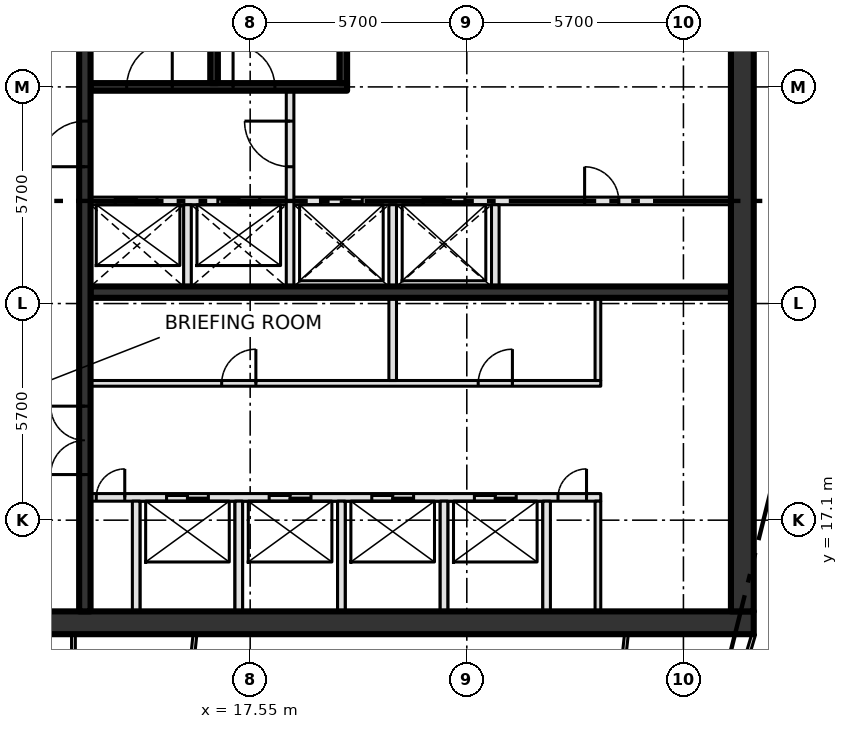
"""IFC4 building model, lengths in metres.
Left out: names, types, materials, properties, quantities, classifications, styles, units other than length and angle.
Written with IfcOpenShell. Run it as: python <this file> out.ifc"""

import sys

from ifc_helpers import new_model, si_unit, direction, frame, frame_2d, origin, place, context, subcontext, project, spatial, rectangle, extrude, element, fill, save


model = new_model("IFC4")
c1 = context("Model", 3, precision=1e-05, world=origin(), true_north=direction((0.0, 1.0)))
c2 = subcontext(c1, "Body", "Model", "MODEL_VIEW")
j1 = project(units=[si_unit("LENGTHUNIT", "METRE"), si_unit("PLANEANGLEUNIT", "RADIAN")], contexts=[c1])
p1 = place(None, origin())
s1 = spatial("IfcSite", under=j1, at=p1, CompositionType="ELEMENT")
p2 = place(p1, origin())
s2 = spatial("IfcBuilding", under=s1, at=p2, CompositionType="ELEMENT")
p3 = place(p2, frame((0.0, 0.0, 315.0)))
s3 = spatial("IfcBuildingStorey", under=s2, at=p3, CompositionType="ELEMENT", Elevation=315.0)
p4 = place(p3, frame((8.0, 14.4, -0.3), z_axis=(0.0, 0.0, 1.0), x_axis=(1.0, 0.0, 0.0)))
e1 = element("IfcWall", 1, at=p4, inside=s3, PredefinedType="SHEAR", context=c2, shape_type="SweptSolid", body=[
    extrude(rectangle(XDim=22.8, YDim=0.6, at=frame_2d((11.4, 0.0))), origin(), (0.0, 0.0, 1.0), 4.2),
])
p5 = place(p4, frame((2.3, 0.0, 0.3)))
e2 = element("IfcOpeningElement", 2, at=p5, cuts=e1, PredefinedType="OPENING", context=c2, shape_type="SweptSolid", body=[
    extrude(rectangle(XDim=1.8, YDim=2.1, at=frame_2d((0.9, 1.05))), frame((0.0, 0.31, 0.0), z_axis=(0.0, -1.0, 0.0), x_axis=(1.0, 0.0, 0.0)), (0.0, 0.0, 1.0), 0.62),
])
p6 = place(p3, frame((30.5, 14.7, -0.3), z_axis=(0.0, 0.0, 1.0), x_axis=(0.0, 1.0, 0.0)))
e3 = element("IfcWall", 3, at=p6, inside=s3, PredefinedType="SHEAR", context=c2, shape_type="SweptSolid", body=[
    extrude(rectangle(XDim=21.0, YDim=0.6, at=frame_2d((10.5, 0.0))), origin(), (0.0, 0.0, 1.0), 4.2),
])
p7 = place(p3, frame((13.35, 17.7, 0.0), z_axis=(0.0, 0.0, 1.0), x_axis=(1.0, 0.0, 0.0)))
e4 = element("IfcWall", 4, at=p7, inside=s3, PredefinedType="SOLIDWALL", context=c2, shape_type="SweptSolid", body=[
    extrude(rectangle(XDim=13.425, YDim=0.2, at=frame_2d((6.712, 0.0))), origin(), (0.0, 0.0, 1.0), 3.9),
])
p8 = place(p7, frame((2.0, 0.0, 0.0)))
e5 = element("IfcOpeningElement", 5, at=p8, cuts=e4, PredefinedType="OPENING", context=c2, shape_type="SweptSolid", body=[
    extrude(rectangle(XDim=1.1, YDim=2.1, at=frame_2d((0.55, 1.05))), frame((0.0, 0.11, 0.0), z_axis=(0.0, -1.0, 0.0), x_axis=(1.0, 0.0, 0.0)), (0.0, 0.0, 1.0), 0.22),
])
p9 = place(p7, frame((4.7, 0.0, 0.0)))
e6 = element("IfcOpeningElement", 6, at=p9, cuts=e4, PredefinedType="OPENING", context=c2, shape_type="SweptSolid", body=[
    extrude(rectangle(XDim=1.1, YDim=2.1, at=frame_2d((0.55, 1.05))), frame((0.0, 0.11, 0.0), z_axis=(0.0, -1.0, 0.0), x_axis=(1.0, 0.0, 0.0)), (0.0, 0.0, 1.0), 0.22),
])
p10 = place(p7, frame((7.4, 0.0, 0.0)))
e7 = element("IfcOpeningElement", 7, at=p10, cuts=e4, PredefinedType="OPENING", context=c2, shape_type="SweptSolid", body=[
    extrude(rectangle(XDim=1.1, YDim=2.1, at=frame_2d((0.55, 1.05))), frame((0.0, 0.11, 0.0), z_axis=(0.0, -1.0, 0.0), x_axis=(1.0, 0.0, 0.0)), (0.0, 0.0, 1.0), 0.22),
])
p11 = place(p7, frame((10.1, 0.0, 0.0)))
e8 = element("IfcOpeningElement", 8, at=p11, cuts=e4, PredefinedType="OPENING", context=c2, shape_type="SweptSolid", body=[
    extrude(rectangle(XDim=1.1, YDim=2.1, at=frame_2d((0.55, 1.05))), frame((0.0, 0.11, 0.0), z_axis=(0.0, -1.0, 0.0), x_axis=(1.0, 0.0, 0.0)), (0.0, 0.0, 1.0), 0.22),
])
p12 = place(p7, frame((0.15, 0.0, 0.0)))
e9 = element("IfcOpeningElement", 9, at=p12, cuts=e4, PredefinedType="OPENING", context=c2, shape_type="SweptSolid", body=[
    extrude(rectangle(XDim=0.75, YDim=2.1, at=frame_2d((0.375, 1.05))), frame((0.0, 0.11, 0.0), z_axis=(0.0, -1.0, 0.0), x_axis=(1.0, 0.0, 0.0)), (0.0, 0.0, 1.0), 0.22),
])
p13 = place(p7, frame((12.3, 0.0, 0.0)))
e10 = element("IfcOpeningElement", 10, at=p13, cuts=e4, PredefinedType="OPENING", context=c2, shape_type="SweptSolid", body=[
    extrude(rectangle(XDim=0.75, YDim=2.1, at=frame_2d((0.375, 1.05))), frame((0.0, 0.11, 0.0), z_axis=(0.0, -1.0, 0.0), x_axis=(1.0, 0.0, 0.0)), (0.0, 0.0, 1.0), 0.22),
])
p14 = place(p3, frame((13.35, 20.7, 0.0), z_axis=(0.0, 0.0, 1.0), x_axis=(1.0, 0.0, 0.0)))
e11 = element("IfcWall", 11, at=p14, inside=s3, PredefinedType="PARTITIONING", context=c2, shape_type="SweptSolid", body=[
    extrude(rectangle(XDim=13.425, YDim=0.15, at=frame_2d((6.712, 0.0))), origin(), (0.0, 0.0, 1.0), 3.9),
])
p15 = place(p14, frame((3.45, 0.0, 0.0)))
e12 = element("IfcOpeningElement", 12, at=p15, cuts=e11, PredefinedType="OPENING", context=c2, shape_type="SweptSolid", body=[
    extrude(rectangle(XDim=0.9, YDim=2.1, at=frame_2d((0.45, 1.05))), frame((0.0, 0.085, 0.0), z_axis=(0.0, -1.0, 0.0), x_axis=(1.0, 0.0, 0.0)), (0.0, 0.0, 1.0), 0.17),
])
p16 = place(p14, frame((10.2, 0.0, 0.0)))
e13 = element("IfcOpeningElement", 13, at=p16, cuts=e11, PredefinedType="OPENING", context=c2, shape_type="SweptSolid", body=[
    extrude(rectangle(XDim=0.9, YDim=2.1, at=frame_2d((0.45, 1.05))), frame((0.0, 0.085, 0.0), z_axis=(0.0, -1.0, 0.0), x_axis=(1.0, 0.0, 0.0)), (0.0, 0.0, 1.0), 0.17),
])
p17 = place(p3, frame((13.35, 23.1, 0.0), z_axis=(0.0, 0.0, 1.0), x_axis=(1.0, 0.0, 0.0)))
e14 = element("IfcWall", 14, at=p17, inside=s3, PredefinedType="SHEAR", context=c2, shape_type="SweptSolid", body=[
    extrude(rectangle(XDim=16.85, YDim=0.3, at=frame_2d((8.425, 0.0))), origin(), (0.0, 0.0, 1.0), 3.9),
])
p18 = place(p3, frame((13.35, 25.5, 0.0), z_axis=(0.0, 0.0, 1.0), x_axis=(1.0, 0.0, 0.0)))
e15 = element("IfcWall", 15, at=p18, inside=s3, PredefinedType="SOLIDWALL", context=c2, shape_type="SweptSolid", body=[
    extrude(rectangle(XDim=16.85, YDim=0.2, at=frame_2d((8.425, 0.0))), origin(), (0.0, 0.0, 1.0), 3.9),
])
p19 = place(p18, frame((0.65, 0.0, 0.0)))
e16 = element("IfcOpeningElement", 16, at=p19, cuts=e15, PredefinedType="OPENING", context=c2, shape_type="SweptSolid", body=[
    extrude(rectangle(XDim=1.1, YDim=2.1, at=frame_2d((0.55, 1.05))), frame((0.0, 0.11, 0.0), z_axis=(0.0, -1.0, 0.0), x_axis=(1.0, 0.0, 0.0)), (0.0, 0.0, 1.0), 0.22),
])
p20 = place(p18, frame((3.35, 0.0, 0.0)))
e17 = element("IfcOpeningElement", 17, at=p20, cuts=e15, PredefinedType="OPENING", context=c2, shape_type="SweptSolid", body=[
    extrude(rectangle(XDim=1.1, YDim=2.1, at=frame_2d((0.55, 1.05))), frame((0.0, 0.11, 0.0), z_axis=(0.0, -1.0, 0.0), x_axis=(1.0, 0.0, 0.0)), (0.0, 0.0, 1.0), 0.22),
])
p21 = place(p18, frame((6.05, 0.0, 0.0)))
e18 = element("IfcOpeningElement", 18, at=p21, cuts=e15, PredefinedType="OPENING", context=c2, shape_type="SweptSolid", body=[
    extrude(rectangle(XDim=1.1, YDim=2.1, at=frame_2d((0.55, 1.05))), frame((0.0, 0.11, 0.0), z_axis=(0.0, -1.0, 0.0), x_axis=(1.0, 0.0, 0.0)), (0.0, 0.0, 1.0), 0.22),
])
p22 = place(p18, frame((8.75, 0.0, 0.0)))
e19 = element("IfcOpeningElement", 19, at=p22, cuts=e15, PredefinedType="OPENING", context=c2, shape_type="SweptSolid", body=[
    extrude(rectangle(XDim=1.1, YDim=2.1, at=frame_2d((0.55, 1.05))), frame((0.0, 0.11, 0.0), z_axis=(0.0, -1.0, 0.0), x_axis=(1.0, 0.0, 0.0)), (0.0, 0.0, 1.0), 0.22),
])
p23 = place(p18, frame((13.0, 0.0, 0.0)))
e20 = element("IfcOpeningElement", 20, at=p23, cuts=e15, PredefinedType="OPENING", context=c2, shape_type="SweptSolid", body=[
    extrude(rectangle(XDim=0.9, YDim=2.1, at=frame_2d((0.45, 1.05))), frame((0.0, 0.11, 0.0), z_axis=(0.0, -1.0, 0.0), x_axis=(1.0, 0.0, 0.0)), (0.0, 0.0, 1.0), 0.22),
])
p24 = place(p3, frame((13.35, 28.5, 0.0), z_axis=(0.0, 0.0, 1.0), x_axis=(1.0, 0.0, 0.0)))
e21 = element("IfcWall", 21, at=p24, inside=s3, PredefinedType="SOLIDWALL", context=c2, shape_type="SweptSolid", body=[
    extrude(rectangle(XDim=6.75, YDim=0.2, at=frame_2d((3.375, 0.0))), origin(), (0.0, 0.0, 1.0), 3.9),
])
p25 = place(p24, frame((0.95, 0.0, 0.0)))
e22 = element("IfcOpeningElement", 22, at=p25, cuts=e21, PredefinedType="OPENING", context=c2, shape_type="SweptSolid", body=[
    extrude(rectangle(XDim=1.2, YDim=2.1, at=frame_2d((0.6, 1.05))), frame((0.0, 0.11, 0.0), z_axis=(0.0, -1.0, 0.0), x_axis=(1.0, 0.0, 0.0)), (0.0, 0.0, 1.0), 0.22),
])
p26 = place(p24, frame((3.75, 0.0, 0.0)))
e23 = element("IfcOpeningElement", 23, at=p26, cuts=e21, PredefinedType="OPENING", context=c2, shape_type="SweptSolid", body=[
    extrude(rectangle(XDim=1.1, YDim=2.1, at=frame_2d((0.55, 1.05))), frame((0.0, 0.11, 0.0), z_axis=(0.0, -1.0, 0.0), x_axis=(1.0, 0.0, 0.0)), (0.0, 0.0, 1.0), 0.22),
])
p27 = place(p3, frame((13.2, 14.7, 0.0), z_axis=(0.0, 0.0, 1.0), x_axis=(0.0, 1.0, 0.0)))
e24 = element("IfcWall", 24, at=p27, inside=s3, PredefinedType="SHEAR", context=c2, shape_type="SweptSolid", body=[
    extrude(rectangle(XDim=21.0, YDim=0.3, at=frame_2d((10.5, 0.0))), origin(), (0.0, 0.0, 1.0), 3.9),
])
p28 = place(p27, frame((3.6, 0.0, 0.0)))
e25 = element("IfcOpeningElement", 25, at=p28, cuts=e24, PredefinedType="OPENING", context=c2, shape_type="SweptSolid", body=[
    extrude(rectangle(XDim=1.8, YDim=2.1, at=frame_2d((0.9, 1.05))), frame((0.0, 0.16, 0.0), z_axis=(0.0, -1.0, 0.0), x_axis=(1.0, 0.0, 0.0)), (0.0, 0.0, 1.0), 0.32),
])
p29 = place(p27, frame((11.7, 0.0, 0.0)))
e26 = element("IfcOpeningElement", 26, at=p29, cuts=e24, PredefinedType="OPENING", context=c2, shape_type="SweptSolid", body=[
    extrude(rectangle(XDim=1.2, YDim=2.1, at=frame_2d((0.6, 1.05))), frame((0.0, 0.16, 0.0), z_axis=(0.0, -1.0, 0.0), x_axis=(1.0, 0.0, 0.0)), (0.0, 0.0, 1.0), 0.32),
])
p30 = place(p3, frame((14.55, 14.7, 0.0), z_axis=(0.0, 0.0, 1.0), x_axis=(0.0, 1.0, 0.0)))
e27 = element("IfcWall", 27, at=p30, inside=s3, PredefinedType="SOLIDWALL", context=c2, shape_type="SweptSolid", body=[
    extrude(rectangle(XDim=2.9, YDim=0.2, at=frame_2d((1.45, 0.0))), origin(), (0.0, 0.0, 1.0), 3.9),
])
p31 = place(p3, frame((15.9, 23.25, 0.0), z_axis=(0.0, 0.0, 1.0), x_axis=(0.0, 1.0, 0.0)))
e28 = element("IfcWall", 28, at=p31, inside=s3, PredefinedType="SOLIDWALL", context=c2, shape_type="SweptSolid", body=[
    extrude(rectangle(XDim=2.15, YDim=0.2, at=frame_2d((1.075, 0.0))), origin(), (0.0, 0.0, 1.0), 3.9),
])
p32 = place(p3, frame((16.6, 28.6, 0.0), z_axis=(0.0, 0.0, 1.0), x_axis=(0.0, 1.0, 0.0)))
e29 = element("IfcWall", 29, at=p32, inside=s3, PredefinedType="SOLIDWALL", context=c2, shape_type="SweptSolid", body=[
    extrude(rectangle(XDim=7.1, YDim=0.2, at=frame_2d((3.55, 0.0))), origin(), (0.0, 0.0, 1.0), 3.9),
])
p33 = place(p3, frame((17.25, 14.7, 0.0), z_axis=(0.0, 0.0, 1.0), x_axis=(0.0, 1.0, 0.0)))
e30 = element("IfcWall", 30, at=p33, inside=s3, PredefinedType="SOLIDWALL", context=c2, shape_type="SweptSolid", body=[
    extrude(rectangle(XDim=2.9, YDim=0.2, at=frame_2d((1.45, 0.0))), origin(), (0.0, 0.0, 1.0), 3.9),
])
p34 = place(p3, frame((18.6, 23.25, 0.0), z_axis=(0.0, 0.0, 1.0), x_axis=(0.0, 1.0, 0.0)))
e31 = element("IfcWall", 31, at=p34, inside=s3, PredefinedType="SOLIDWALL", context=c2, shape_type="SweptSolid", body=[
    extrude(rectangle(XDim=5.15, YDim=0.2, at=frame_2d((2.575, 0.0))), origin(), (0.0, 0.0, 1.0), 3.9),
])
p35 = place(p34, frame((3.15, 0.0, 0.0)))
e32 = element("IfcOpeningElement", 32, at=p35, cuts=e31, PredefinedType="OPENING", context=c2, shape_type="SweptSolid", body=[
    extrude(rectangle(XDim=1.2, YDim=2.1, at=frame_2d((0.6, 1.05))), frame((0.0, 0.11, 0.0), z_axis=(0.0, -1.0, 0.0), x_axis=(1.0, 0.0, 0.0)), (0.0, 0.0, 1.0), 0.22),
])
p36 = place(p3, frame((19.95, 14.7, 0.0), z_axis=(0.0, 0.0, 1.0), x_axis=(0.0, 1.0, 0.0)))
e33 = element("IfcWall", 33, at=p36, inside=s3, PredefinedType="SOLIDWALL", context=c2, shape_type="SweptSolid", body=[
    extrude(rectangle(XDim=2.9, YDim=0.2, at=frame_2d((1.45, 0.0))), origin(), (0.0, 0.0, 1.0), 3.9),
])
p37 = place(p3, frame((20.0, 28.6, 0.0), z_axis=(0.0, 0.0, 1.0), x_axis=(0.0, 1.0, 0.0)))
e34 = element("IfcWall", 34, at=p37, inside=s3, PredefinedType="SOLIDWALL", context=c2, shape_type="SweptSolid", body=[
    extrude(rectangle(XDim=7.1, YDim=0.2, at=frame_2d((3.55, 0.0))), origin(), (0.0, 0.0, 1.0), 3.9),
])
p38 = place(p3, frame((21.3, 20.775, 0.0), z_axis=(0.0, 0.0, 1.0), x_axis=(0.0, 1.0, 0.0)))
e35 = element("IfcWall", 35, at=p38, inside=s3, PredefinedType="SOLIDWALL", context=c2, shape_type="SweptSolid", body=[
    extrude(rectangle(XDim=4.625, YDim=0.2, at=frame_2d((2.312, 0.0))), origin(), (0.0, 0.0, 1.0), 3.9),
])
p39 = place(p3, frame((22.65, 14.7, 0.0), z_axis=(0.0, 0.0, 1.0), x_axis=(0.0, 1.0, 0.0)))
e36 = element("IfcWall", 36, at=p39, inside=s3, PredefinedType="SOLIDWALL", context=c2, shape_type="SweptSolid", body=[
    extrude(rectangle(XDim=2.9, YDim=0.2, at=frame_2d((1.45, 0.0))), origin(), (0.0, 0.0, 1.0), 3.9),
])
p40 = place(p3, frame((24.0, 23.25, 0.0), z_axis=(0.0, 0.0, 1.0), x_axis=(0.0, 1.0, 0.0)))
e37 = element("IfcWall", 37, at=p40, inside=s3, PredefinedType="SOLIDWALL", context=c2, shape_type="SweptSolid", body=[
    extrude(rectangle(XDim=2.15, YDim=0.2, at=frame_2d((1.075, 0.0))), origin(), (0.0, 0.0, 1.0), 3.9),
])
p41 = place(p3, frame((25.35, 14.7, 0.0), z_axis=(0.0, 0.0, 1.0), x_axis=(0.0, 1.0, 0.0)))
e38 = element("IfcWall", 38, at=p41, inside=s3, PredefinedType="SOLIDWALL", context=c2, shape_type="SweptSolid", body=[
    extrude(rectangle(XDim=2.9, YDim=0.2, at=frame_2d((1.45, 0.0))), origin(), (0.0, 0.0, 1.0), 3.9),
])
p42 = place(p3, frame((26.7, 14.7, 0.0), z_axis=(0.0, 0.0, 1.0), x_axis=(0.0, 1.0, 0.0)))
e39 = element("IfcWall", 39, at=p42, inside=s3, PredefinedType="PARTITIONING", context=c2, shape_type="SweptSolid", body=[
    extrude(rectangle(XDim=2.9, YDim=0.15, at=frame_2d((1.45, 0.0))), origin(), (0.0, 0.0, 1.0), 3.9),
])
p43 = place(p3, frame((26.7, 20.775, 0.0), z_axis=(0.0, 0.0, 1.0), x_axis=(0.0, 1.0, 0.0)))
e40 = element("IfcWall", 40, at=p43, inside=s3, PredefinedType="PARTITIONING", context=c2, shape_type="SweptSolid", body=[
    extrude(rectangle(XDim=2.175, YDim=0.15, at=frame_2d((1.087, 0.0))), origin(), (0.0, 0.0, 1.0), 3.9),
])
p44 = place(p3, frame((12.9, 10.078, 0.0), z_axis=(0.0, 0.0, 1.0), x_axis=(0.0, 1.0, 0.0)))
e41 = element("IfcWall", 41, at=p44, inside=s3, PredefinedType="PARTITIONING", context=c2, shape_type="SweptSolid", body=[
    extrude(rectangle(XDim=4.022, YDim=0.1, at=frame_2d((2.011, 0.0))), origin(), (0.0, 0.0, 1.0), 3.9),
])
p45 = place(p3, frame((30.8, 14.1, 0.0), z_axis=(0.0, 0.0, 1.0), x_axis=(-0.28588265334, -0.958264633867, 0.0)))
e42 = element("IfcWall", 42, at=p45, inside=s3, PredefinedType="PARTITIONING", context=c2, shape_type="SweptSolid", body=[
    extrude(rectangle(XDim=8.776, YDim=0.1, at=frame_2d((4.388, 0.0))), origin(), (0.0, 0.0, 1.0), 3.9),
])
p46 = place(p45, frame((3.68, 0.0, 0.0)))
e43 = element("IfcOpeningElement", 43, at=p46, cuts=e42, PredefinedType="OPENING", context=c2, shape_type="SweptSolid", body=[
    extrude(rectangle(XDim=1.0, YDim=2.1, at=frame_2d((0.5, 1.05))), frame((0.0, 0.06, 0.0), z_axis=(0.0, -1.0, 0.0), x_axis=(1.0, 0.0, 0.0)), (0.0, 0.0, 1.0), 0.12),
])
p47 = place(p3, frame((15.554, 8.924, 0.0), z_axis=(0.0, 0.0, 1.0), x_axis=(0.104513853303, 0.994523430829, 0.0)))
e44 = element("IfcWall", 44, at=p47, inside=s3, PredefinedType="PARTITIONING", context=c2, shape_type="SweptSolid", body=[
    extrude(rectangle(XDim=5.205, YDim=0.1, at=frame_2d((2.602, 0.0))), origin(), (0.0, 0.0, 1.0), 3.9),
])
p48 = place(p3, frame((26.615, 6.166, 0.0), z_axis=(0.0, 0.0, 1.0), x_axis=(0.10453822663, 0.994520869149, 0.0)))
e45 = element("IfcWall", 45, at=p48, inside=s3, PredefinedType="PARTITIONING", context=c2, shape_type="SweptSolid", body=[
    extrude(rectangle(XDim=7.978, YDim=0.1, at=frame_2d((3.989, 0.0))), origin(), (0.0, 0.0, 1.0), 3.9),
])
p49 = place(p8, origin())
e46 = element("IfcDoor", 46, at=p49, inside=s3, OperationType="SLIDING_TO_LEFT", PredefinedType="DOOR", context=c2, shape_type="SweptSolid", body=[
    extrude(rectangle(XDim=1.1, YDim=2.1, at=frame_2d((0.55, 1.05))), frame((0.0, 0.025, 0.0), z_axis=(0.0, -1.0, 0.0), x_axis=(1.0, 0.0, 0.0)), (0.0, 0.0, 1.0), 0.05),
])
fill(e5, e46)
p50 = place(p9, origin())
e47 = element("IfcDoor", 47, at=p50, inside=s3, OperationType="SLIDING_TO_LEFT", PredefinedType="DOOR", context=c2, shape_type="SweptSolid", body=[
    extrude(rectangle(XDim=1.1, YDim=2.1, at=frame_2d((0.55, 1.05))), frame((0.0, 0.025, 0.0), z_axis=(0.0, -1.0, 0.0), x_axis=(1.0, 0.0, 0.0)), (0.0, 0.0, 1.0), 0.05),
])
fill(e6, e47)
p51 = place(p10, origin())
e48 = element("IfcDoor", 48, at=p51, inside=s3, OperationType="SLIDING_TO_LEFT", PredefinedType="DOOR", context=c2, shape_type="SweptSolid", body=[
    extrude(rectangle(XDim=1.1, YDim=2.1, at=frame_2d((0.55, 1.05))), frame((0.0, 0.025, 0.0), z_axis=(0.0, -1.0, 0.0), x_axis=(1.0, 0.0, 0.0)), (0.0, 0.0, 1.0), 0.05),
])
fill(e7, e48)
p52 = place(p11, origin())
e49 = element("IfcDoor", 49, at=p52, inside=s3, OperationType="SLIDING_TO_LEFT", PredefinedType="DOOR", context=c2, shape_type="SweptSolid", body=[
    extrude(rectangle(XDim=1.1, YDim=2.1, at=frame_2d((0.55, 1.05))), frame((0.0, 0.025, 0.0), z_axis=(0.0, -1.0, 0.0), x_axis=(1.0, 0.0, 0.0)), (0.0, 0.0, 1.0), 0.05),
])
fill(e8, e49)
p53 = place(p19, origin())
e50 = element("IfcDoor", 50, at=p53, inside=s3, OperationType="SLIDING_TO_LEFT", PredefinedType="DOOR", context=c2, shape_type="SweptSolid", body=[
    extrude(rectangle(XDim=1.1, YDim=2.1, at=frame_2d((0.55, 1.05))), frame((0.0, 0.025, 0.0), z_axis=(0.0, -1.0, 0.0), x_axis=(1.0, 0.0, 0.0)), (0.0, 0.0, 1.0), 0.05),
])
fill(e16, e50)
p54 = place(p20, origin())
e51 = element("IfcDoor", 51, at=p54, inside=s3, OperationType="SLIDING_TO_LEFT", PredefinedType="DOOR", context=c2, shape_type="SweptSolid", body=[
    extrude(rectangle(XDim=1.1, YDim=2.1, at=frame_2d((0.55, 1.05))), frame((0.0, 0.025, 0.0), z_axis=(0.0, -1.0, 0.0), x_axis=(1.0, 0.0, 0.0)), (0.0, 0.0, 1.0), 0.05),
])
fill(e17, e51)
p55 = place(p21, origin())
e52 = element("IfcDoor", 52, at=p55, inside=s3, OperationType="SLIDING_TO_LEFT", PredefinedType="DOOR", context=c2, shape_type="SweptSolid", body=[
    extrude(rectangle(XDim=1.1, YDim=2.1, at=frame_2d((0.55, 1.05))), frame((0.0, 0.025, 0.0), z_axis=(0.0, -1.0, 0.0), x_axis=(1.0, 0.0, 0.0)), (0.0, 0.0, 1.0), 0.05),
])
fill(e18, e52)
p56 = place(p22, origin())
e53 = element("IfcDoor", 53, at=p56, inside=s3, OperationType="SLIDING_TO_LEFT", PredefinedType="DOOR", context=c2, shape_type="SweptSolid", body=[
    extrude(rectangle(XDim=1.1, YDim=2.1, at=frame_2d((0.55, 1.05))), frame((0.0, 0.025, 0.0), z_axis=(0.0, -1.0, 0.0), x_axis=(1.0, 0.0, 0.0)), (0.0, 0.0, 1.0), 0.05),
])
fill(e19, e53)
p57 = place(p12, origin())
e54 = element("IfcDoor", 54, at=p57, inside=s3, OperationType="SINGLE_SWING_RIGHT", PredefinedType="DOOR", context=c2, shape_type="SweptSolid", body=[
    extrude(rectangle(XDim=0.75, YDim=2.1, at=frame_2d((0.375, 1.05))), frame((0.0, 0.025, 0.0), z_axis=(0.0, -1.0, 0.0), x_axis=(1.0, 0.0, 0.0)), (0.0, 0.0, 1.0), 0.05),
])
fill(e9, e54)
p58 = place(p13, origin())
e55 = element("IfcDoor", 55, at=p58, inside=s3, OperationType="SINGLE_SWING_RIGHT", PredefinedType="DOOR", context=c2, shape_type="SweptSolid", body=[
    extrude(rectangle(XDim=0.75, YDim=2.1, at=frame_2d((0.375, 1.05))), frame((0.0, 0.025, 0.0), z_axis=(0.0, -1.0, 0.0), x_axis=(1.0, 0.0, 0.0)), (0.0, 0.0, 1.0), 0.05),
])
fill(e10, e55)
p59 = place(p15, origin())
e56 = element("IfcDoor", 56, at=p59, inside=s3, OperationType="SINGLE_SWING_RIGHT", PredefinedType="DOOR", context=c2, shape_type="SweptSolid", body=[
    extrude(rectangle(XDim=0.9, YDim=2.1, at=frame_2d((0.45, 1.05))), frame((0.0, 0.025, 0.0), z_axis=(0.0, -1.0, 0.0), x_axis=(1.0, 0.0, 0.0)), (0.0, 0.0, 1.0), 0.05),
])
fill(e12, e56)
p60 = place(p16, origin())
e57 = element("IfcDoor", 57, at=p60, inside=s3, OperationType="SINGLE_SWING_RIGHT", PredefinedType="DOOR", context=c2, shape_type="SweptSolid", body=[
    extrude(rectangle(XDim=0.9, YDim=2.1, at=frame_2d((0.45, 1.05))), frame((0.0, 0.025, 0.0), z_axis=(0.0, -1.0, 0.0), x_axis=(1.0, 0.0, 0.0)), (0.0, 0.0, 1.0), 0.05),
])
fill(e13, e57)
p61 = place(p23, origin())
e58 = element("IfcDoor", 58, at=p61, inside=s3, OperationType="SINGLE_SWING_LEFT", PredefinedType="DOOR", context=c2, shape_type="SweptSolid", body=[
    extrude(rectangle(XDim=0.9, YDim=2.1, at=frame_2d((0.45, 1.05))), frame((0.0, 0.025, 0.0), z_axis=(0.0, -1.0, 0.0), x_axis=(1.0, 0.0, 0.0)), (0.0, 0.0, 1.0), 0.05),
])
fill(e20, e58)
p62 = place(p25, origin())
e59 = element("IfcDoor", 59, at=p62, inside=s3, OperationType="SINGLE_SWING_RIGHT", PredefinedType="DOOR", context=c2, shape_type="SweptSolid", body=[
    extrude(rectangle(XDim=1.2, YDim=2.1, at=frame_2d((0.6, 1.05))), frame((0.0, 0.025, 0.0), z_axis=(0.0, -1.0, 0.0), x_axis=(1.0, 0.0, 0.0)), (0.0, 0.0, 1.0), 0.05),
])
fill(e22, e59)
p63 = place(p26, origin())
e60 = element("IfcDoor", 60, at=p63, inside=s3, OperationType="SINGLE_SWING_LEFT", PredefinedType="DOOR", context=c2, shape_type="SweptSolid", body=[
    extrude(rectangle(XDim=1.1, YDim=2.1, at=frame_2d((0.55, 1.05))), frame((0.0, 0.025, 0.0), z_axis=(0.0, -1.0, 0.0), x_axis=(1.0, 0.0, 0.0)), (0.0, 0.0, 1.0), 0.05),
])
fill(e23, e60)
p64 = place(p28, origin())
e61 = element("IfcDoor", 61, at=p64, inside=s3, OperationType="DOUBLE_DOOR_SINGLE_SWING", PredefinedType="DOOR", context=c2, shape_type="SweptSolid", body=[
    extrude(rectangle(XDim=1.8, YDim=2.1, at=frame_2d((0.9, 1.05))), frame((0.0, 0.025, 0.0), z_axis=(0.0, -1.0, 0.0), x_axis=(1.0, 0.0, 0.0)), (0.0, 0.0, 1.0), 0.05),
])
fill(e25, e61)
p65 = place(p29, origin())
e62 = element("IfcDoor", 62, at=p65, inside=s3, OperationType="SINGLE_SWING_LEFT", PredefinedType="DOOR", context=c2, shape_type="SweptSolid", body=[
    extrude(rectangle(XDim=1.2, YDim=2.1, at=frame_2d((0.6, 1.05))), frame((0.0, 0.025, 0.0), z_axis=(0.0, -1.0, 0.0), x_axis=(1.0, 0.0, 0.0)), (0.0, 0.0, 1.0), 0.05),
])
fill(e26, e62)
p66 = place(p35, origin())
e63 = element("IfcDoor", 63, at=p66, inside=s3, OperationType="SINGLE_SWING_RIGHT", PredefinedType="DOOR", context=c2, shape_type="SweptSolid", body=[
    extrude(rectangle(XDim=1.2, YDim=2.1, at=frame_2d((0.6, 1.05))), frame((0.0, 0.025, 0.0), z_axis=(0.0, -1.0, 0.0), x_axis=(1.0, 0.0, 0.0)), (0.0, 0.0, 1.0), 0.05),
])
fill(e32, e63)
save(model, sys.argv[1])
